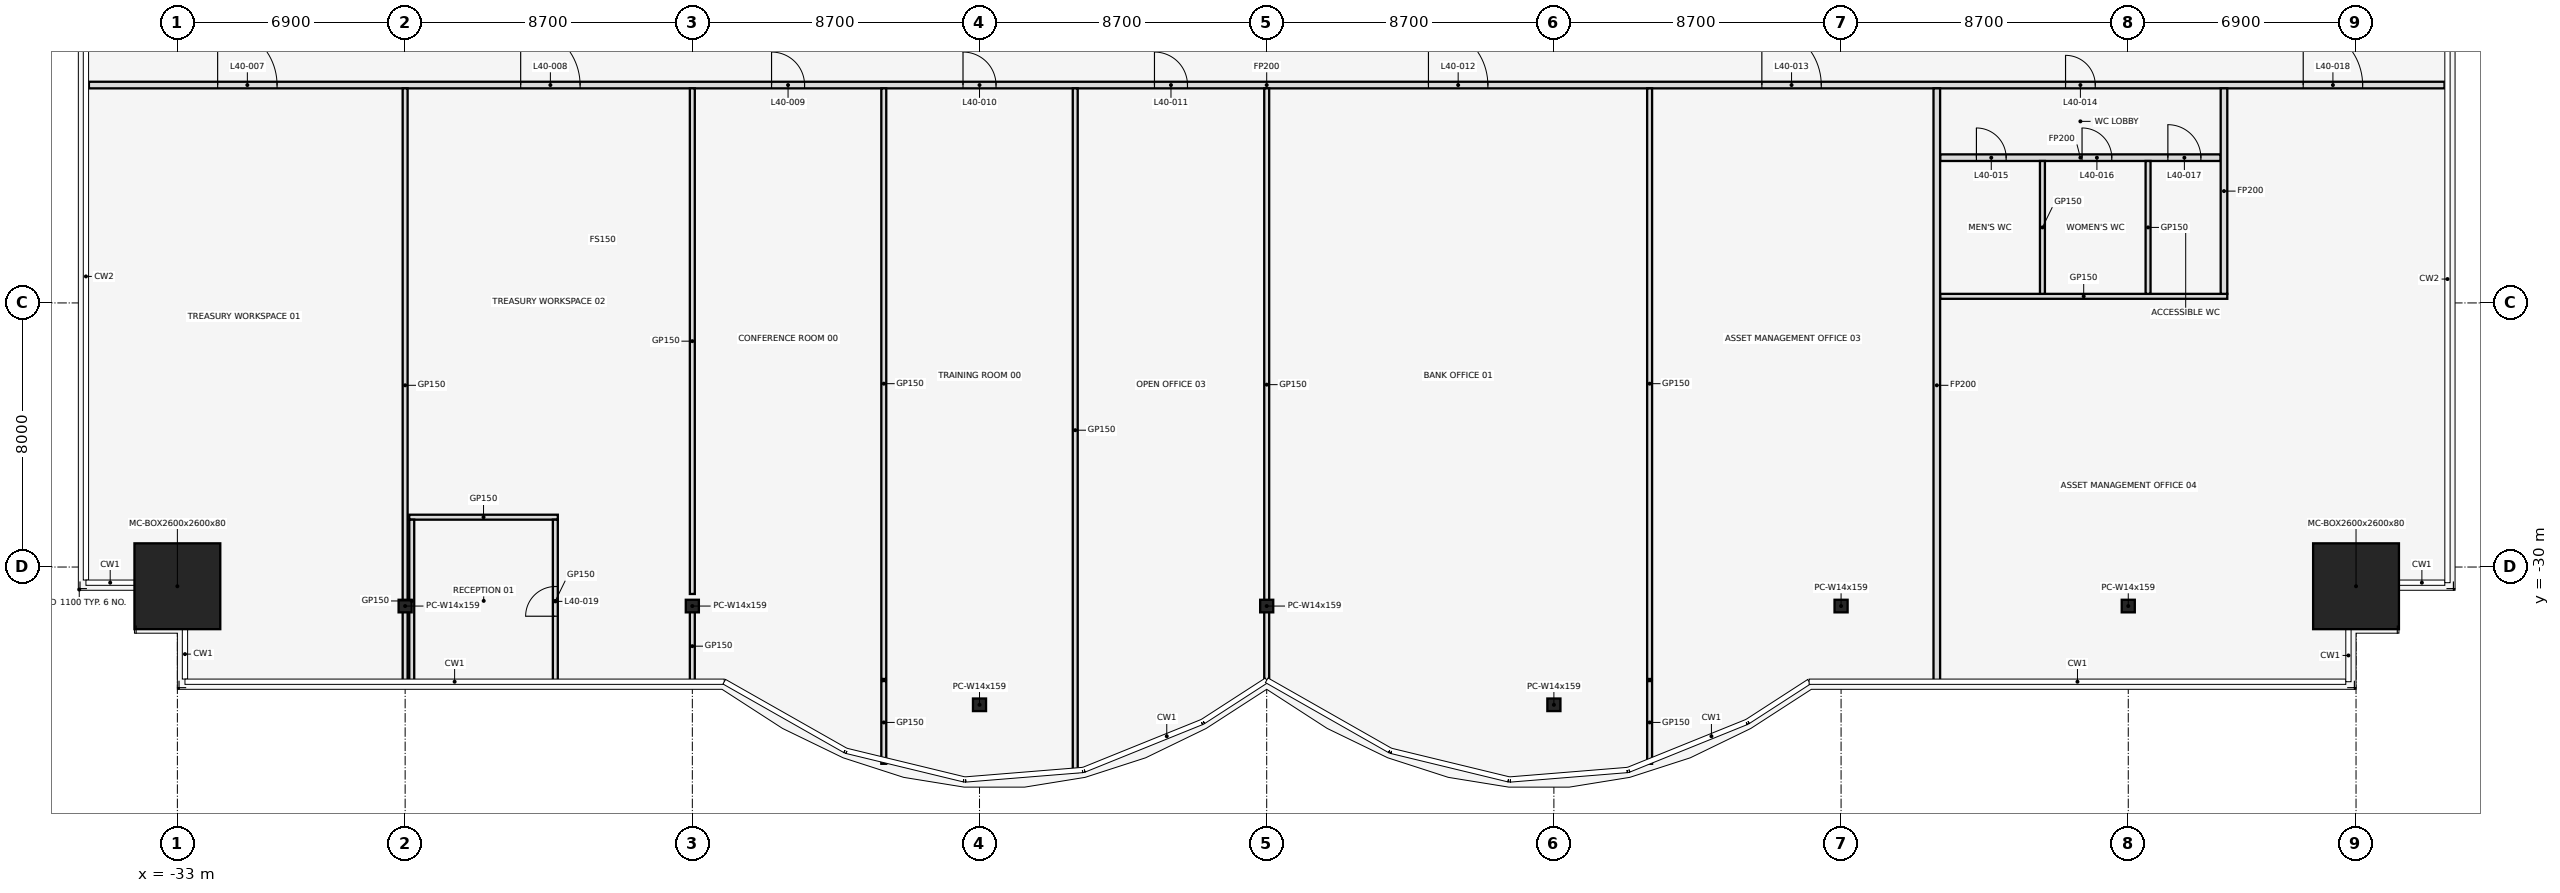
"""IFC4 building model, lengths in metres.
Left out: names, types, materials, properties, quantities, classifications, styles, units other than length and angle.
Written with IfcOpenShell. Run it as: python <this file> out.ifc"""

import sys

from ifc_helpers import new_model, si_unit, direction, frame, frame_2d, origin, origin_2d, place, context, subcontext, project, spatial, rectangle, hollow_rectangle, i_section, extrude, element, fill, save


model = new_model("IFC4")
c1 = context("Model", 3, precision=1e-05, world=origin(), true_north=direction((0.0, 1.0)))
c2 = subcontext(c1, "Body", "Model", "MODEL_VIEW")
j1 = project(units=[si_unit("LENGTHUNIT", "METRE"), si_unit("PLANEANGLEUNIT", "RADIAN")], contexts=[c1])
p1 = place(None, origin())
s1 = spatial("IfcSite", under=j1, at=p1, CompositionType="ELEMENT")
p2 = place(p1, origin())
s2 = spatial("IfcBuilding", under=s1, at=p2, CompositionType="ELEMENT")
p3 = place(p2, frame((0.0, 0.0, 181.4)))
s3 = spatial("IfcBuildingStorey", under=s2, at=p3, CompositionType="ELEMENT", Elevation=181.4)
p4 = place(p3, frame((-33.0, -30.582, 0.0), z_axis=(0.0, 0.0, 1.0), x_axis=(1.0, 0.0, 0.0)))
e1 = element("IfcColumn", 1, at=p4, inside=s3, PredefinedType="COLUMN", context=c2, shape_type="SweptSolid", body=[
    extrude(hollow_rectangle(XDim=2.6, YDim=2.6, WallThickness=0.08, at=origin_2d()), origin(), (0.0, 0.0, 1.0), 4.1),
])
for number, where, z_axis, x_axis in (
    (2, (-26.1, -31.182, 0.0), (0.0, 0.0, 1.0), (1.0, 0.0, 0.0)),
    (3, (-17.4, -31.182, 0.0), (0.0, 0.0, 1.0), (1.0, 0.0, 0.0)),
    (4, (-8.7, -34.173, 0.0), (0.0, 0.0, 1.0), (1.0, 0.0, 0.0)),
    (5, (0.0, -31.182, 0.0), (0.0, 0.0, 1.0), (1.0, 0.0, 0.0)),
    (6, (8.7, -34.173, 0.0), (0.0, 0.0, 1.0), (1.0, 0.0, 0.0)),
    (7, (17.4, -31.182, 0.0), (0.0, 0.0, 1.0), (1.0, 0.0, 0.0)),
    (8, (26.1, -31.182, 0.0), (0.0, 0.0, 1.0), (1.0, 0.0, 0.0)),
):
    element("IfcColumn", number, at=place(p3, frame(where, z_axis=z_axis, x_axis=x_axis)), inside=s3, PredefinedType="COLUMN", context=c2, shape_type="SweptSolid", body=[
        extrude(i_section(OverallWidth=0.396, OverallDepth=0.381, WebThickness=0.019, FlangeThickness=0.03, at=origin_2d()), origin(), (0.0, 0.0, 1.0), 4.1),
    ])
p5 = place(p3, frame((33.0, -30.582, 0.0), z_axis=(0.0, 0.0, 1.0), x_axis=(1.0, 0.0, 0.0)))
e9 = element("IfcColumn", 9, at=p5, inside=s3, PredefinedType="COLUMN", context=c2, shape_type="SweptSolid", body=[
    extrude(hollow_rectangle(XDim=2.6, YDim=2.6, WallThickness=0.08, at=origin_2d()), origin(), (0.0, 0.0, 1.0), 4.1),
])
p6 = place(p3, frame((-25.975, -28.49, 0.0), z_axis=(0.0, 0.0, 1.0), x_axis=(1.0, 0.0, 0.0)))
e10 = element("IfcWall", 10, at=p6, inside=s3, PredefinedType="PARTITIONING", context=c2, shape_type="SweptSolid", body=[
    extrude(rectangle(XDim=4.5, YDim=0.15, at=frame_2d((2.25, 0.0))), origin(), (0.0, 0.0, 1.0), 2.79),
])
p7 = place(p3, frame((20.4, -21.8, 0.0), z_axis=(0.0, 0.0, 1.0), x_axis=(1.0, 0.0, 0.0)))
e11 = element("IfcWall", 11, at=p7, inside=s3, PredefinedType="PARTITIONING", context=c2, shape_type="SweptSolid", body=[
    extrude(rectangle(XDim=8.7, YDim=0.15, at=frame_2d((4.35, 0.0))), origin(), (0.0, 0.0, 1.0), 2.79),
])
p8 = place(p3, frame((20.4, -17.6, 0.0), z_axis=(0.0, 0.0, 1.0), x_axis=(1.0, 0.0, 0.0)))
e12 = element("IfcWall", 12, at=p8, inside=s3, PredefinedType="PARTITIONING", context=c2, shape_type="SweptSolid", body=[
    extrude(rectangle(XDim=8.5, YDim=0.2, at=frame_2d((4.25, 0.0))), origin(), (0.0, 0.0, 1.0), 2.79),
])
p9 = place(p8, frame((1.1, 0.0, 0.0)))
e13 = element("IfcOpeningElement", 13, at=p9, cuts=e12, PredefinedType="OPENING", context=c2, shape_type="SweptSolid", body=[
    extrude(rectangle(XDim=0.9, YDim=2.1, at=frame_2d((0.45, 1.05))), frame((0.0, 0.112, 0.0), z_axis=(0.0, -1.0, 0.0), x_axis=(1.0, 0.0, 0.0)), (0.0, 0.0, 1.0), 0.224),
])
p10 = place(p8, frame((4.3, 0.0, 0.0)))
e14 = element("IfcOpeningElement", 14, at=p10, cuts=e12, PredefinedType="OPENING", context=c2, shape_type="SweptSolid", body=[
    extrude(rectangle(XDim=0.9, YDim=2.1, at=frame_2d((0.45, 1.05))), frame((0.0, 0.112, 0.0), z_axis=(0.0, -1.0, 0.0), x_axis=(1.0, 0.0, 0.0)), (0.0, 0.0, 1.0), 0.224),
])
p11 = place(p8, frame((6.9, 0.0, 0.0)))
e15 = element("IfcOpeningElement", 15, at=p11, cuts=e12, PredefinedType="OPENING", context=c2, shape_type="SweptSolid", body=[
    extrude(rectangle(XDim=1.0, YDim=2.1, at=frame_2d((0.5, 1.05))), frame((0.0, 0.112, 0.0), z_axis=(0.0, -1.0, 0.0), x_axis=(1.0, 0.0, 0.0)), (0.0, 0.0, 1.0), 0.224),
])
p12 = place(p3, frame((-35.68, -15.4, 0.0), z_axis=(0.0, 0.0, 1.0), x_axis=(1.0, 0.0, 0.0)))
e16 = element("IfcWall", 16, at=p12, inside=s3, PredefinedType="PARTITIONING", context=c2, shape_type="SweptSolid", body=[
    extrude(rectangle(XDim=71.36, YDim=0.2, at=frame_2d((35.68, 0.0))), origin(), (0.0, 0.0, 1.0), 2.79),
])
p13 = place(p12, frame((3.9, 0.0, 0.0)))
e17 = element("IfcOpeningElement", 17, at=p13, cuts=e16, PredefinedType="OPENING", context=c2, shape_type="SweptSolid", body=[
    extrude(rectangle(XDim=1.8, YDim=2.1, at=frame_2d((0.9, 1.05))), frame((0.0, 0.112, 0.0), z_axis=(0.0, -1.0, 0.0), x_axis=(1.0, 0.0, 0.0)), (0.0, 0.0, 1.0), 0.224),
])
p14 = place(p12, frame((13.08, 0.0, 0.0)))
e18 = element("IfcOpeningElement", 18, at=p14, cuts=e16, PredefinedType="OPENING", context=c2, shape_type="SweptSolid", body=[
    extrude(rectangle(XDim=1.8, YDim=2.1, at=frame_2d((0.9, 1.05))), frame((0.0, 0.112, 0.0), z_axis=(0.0, -1.0, 0.0), x_axis=(1.0, 0.0, 0.0)), (0.0, 0.0, 1.0), 0.224),
])
p15 = place(p12, frame((20.68, 0.0, 0.0)))
e19 = element("IfcOpeningElement", 19, at=p15, cuts=e16, PredefinedType="OPENING", context=c2, shape_type="SweptSolid", body=[
    extrude(rectangle(XDim=1.0, YDim=2.1, at=frame_2d((0.5, 1.05))), frame((0.0, 0.112, 0.0), z_axis=(0.0, -1.0, 0.0), x_axis=(1.0, 0.0, 0.0)), (0.0, 0.0, 1.0), 0.224),
])
p16 = place(p12, frame((26.48, 0.0, 0.0)))
e20 = element("IfcOpeningElement", 20, at=p16, cuts=e16, PredefinedType="OPENING", context=c2, shape_type="SweptSolid", body=[
    extrude(rectangle(XDim=1.0, YDim=2.1, at=frame_2d((0.5, 1.05))), frame((0.0, 0.112, 0.0), z_axis=(0.0, -1.0, 0.0), x_axis=(1.0, 0.0, 0.0)), (0.0, 0.0, 1.0), 0.224),
])
p17 = place(p12, frame((32.28, 0.0, 0.0)))
e21 = element("IfcOpeningElement", 21, at=p17, cuts=e16, PredefinedType="OPENING", context=c2, shape_type="SweptSolid", body=[
    extrude(rectangle(XDim=1.0, YDim=2.1, at=frame_2d((0.5, 1.05))), frame((0.0, 0.112, 0.0), z_axis=(0.0, -1.0, 0.0), x_axis=(1.0, 0.0, 0.0)), (0.0, 0.0, 1.0), 0.224),
])
p18 = place(p12, frame((40.58, 0.0, 0.0)))
e22 = element("IfcOpeningElement", 22, at=p18, cuts=e16, PredefinedType="OPENING", context=c2, shape_type="SweptSolid", body=[
    extrude(rectangle(XDim=1.8, YDim=2.1, at=frame_2d((0.9, 1.05))), frame((0.0, 0.112, 0.0), z_axis=(0.0, -1.0, 0.0), x_axis=(1.0, 0.0, 0.0)), (0.0, 0.0, 1.0), 0.224),
])
p19 = place(p12, frame((50.68, 0.0, 0.0)))
e23 = element("IfcOpeningElement", 23, at=p19, cuts=e16, PredefinedType="OPENING", context=c2, shape_type="SweptSolid", body=[
    extrude(rectangle(XDim=1.8, YDim=2.1, at=frame_2d((0.9, 1.05))), frame((0.0, 0.112, 0.0), z_axis=(0.0, -1.0, 0.0), x_axis=(1.0, 0.0, 0.0)), (0.0, 0.0, 1.0), 0.224),
])
p20 = place(p12, frame((59.88, 0.0, 0.0)))
e24 = element("IfcOpeningElement", 24, at=p20, cuts=e16, PredefinedType="OPENING", context=c2, shape_type="SweptSolid", body=[
    extrude(rectangle(XDim=0.9, YDim=2.1, at=frame_2d((0.45, 1.05))), frame((0.0, 0.112, 0.0), z_axis=(0.0, -1.0, 0.0), x_axis=(1.0, 0.0, 0.0)), (0.0, 0.0, 1.0), 0.224),
])
p21 = place(p12, frame((67.08, 0.0, 0.0)))
e25 = element("IfcOpeningElement", 25, at=p21, cuts=e16, PredefinedType="OPENING", context=c2, shape_type="SweptSolid", body=[
    extrude(rectangle(XDim=1.8, YDim=2.1, at=frame_2d((0.9, 1.05))), frame((0.0, 0.112, 0.0), z_axis=(0.0, -1.0, 0.0), x_axis=(1.0, 0.0, 0.0)), (0.0, 0.0, 1.0), 0.224),
])
p22 = place(p3, frame((-26.1, -33.49, 0.0), z_axis=(0.0, 0.0, 1.0), x_axis=(0.0, 1.0, 0.0)))
e26 = element("IfcWall", 26, at=p22, inside=s3, PredefinedType="PARTITIONING", context=c2, shape_type="SweptSolid", body=[
    extrude(rectangle(XDim=17.99, YDim=0.15, at=frame_2d((8.995, 0.0))), origin(), (0.0, 0.0, 1.0), 2.79),
])
p23 = place(p3, frame((-25.9, -33.49, 0.0), z_axis=(0.0, 0.0, 1.0), x_axis=(0.0, 1.0, 0.0)))
e27 = element("IfcWall", 27, at=p23, inside=s3, PredefinedType="PARTITIONING", context=c2, shape_type="SweptSolid", body=[
    extrude(rectangle(XDim=4.925, YDim=0.15, at=frame_2d((2.462, 0.0))), origin(), (0.0, 0.0, 1.0), 2.79),
])
p24 = place(p3, frame((-21.55, -33.49, 0.0), z_axis=(0.0, 0.0, 1.0), x_axis=(0.0, 1.0, 0.0)))
e28 = element("IfcWall", 28, at=p24, inside=s3, PredefinedType="PARTITIONING", context=c2, shape_type="SweptSolid", body=[
    extrude(rectangle(XDim=4.925, YDim=0.15, at=frame_2d((2.462, 0.0))), origin(), (0.0, 0.0, 1.0), 2.79),
])
p25 = place(p24, frame((2.0, 0.0, 0.0)))
e29 = element("IfcOpeningElement", 29, at=p25, cuts=e28, PredefinedType="OPENING", context=c2, shape_type="SweptSolid", body=[
    extrude(rectangle(XDim=0.9, YDim=2.1, at=frame_2d((0.45, 1.05))), frame((0.0, 0.087, 0.0), z_axis=(0.0, -1.0, 0.0), x_axis=(1.0, 0.0, 0.0)), (0.0, 0.0, 1.0), 0.174),
])
p26 = place(p3, frame((-17.4, -33.49, 0.0), z_axis=(0.0, 0.0, 1.0), x_axis=(0.0, 1.0, 0.0)))
e30 = element("IfcWall", 30, at=p26, inside=s3, PredefinedType="PARTITIONING", context=c2, shape_type="SweptSolid", body=[
    extrude(rectangle(XDim=2.186, YDim=0.15, at=frame_2d((1.093, 0.0))), origin(), (0.0, 0.0, 1.0), 2.79),
])
p27 = place(p3, frame((-17.4, -30.816, 0.0), z_axis=(0.0, 0.0, 1.0), x_axis=(0.0, 1.0, 0.0)))
e31 = element("IfcWall", 31, at=p27, inside=s3, PredefinedType="PARTITIONING", context=c2, shape_type="SweptSolid", body=[
    extrude(rectangle(XDim=15.316, YDim=0.15, at=frame_2d((7.658, 0.0))), origin(), (0.0, 0.0, 1.0), 2.79),
])
p28 = place(p3, frame((-11.6, -35.96, 0.0), z_axis=(0.0, 0.0, 1.0), x_axis=(0.0, 1.0, 0.0)))
e32 = element("IfcWall", 32, at=p28, inside=s3, PredefinedType="PARTITIONING", context=c2, shape_type="SweptSolid", body=[
    extrude(rectangle(XDim=2.506, YDim=0.15, at=frame_2d((1.253, 0.0))), origin(), (0.0, 0.0, 1.0), 2.79),
])
p29 = place(p3, frame((-11.6, -33.391, 0.0), z_axis=(0.0, 0.0, 1.0), x_axis=(0.0, 1.0, 0.0)))
e33 = element("IfcWall", 33, at=p29, inside=s3, PredefinedType="PARTITIONING", context=c2, shape_type="SweptSolid", body=[
    extrude(rectangle(XDim=17.891, YDim=0.15, at=frame_2d((8.946, 0.0))), origin(), (0.0, 0.0, 1.0), 2.79),
])
p30 = place(p3, frame((-5.8, -36.21, 0.0), z_axis=(0.0, 0.0, 1.0), x_axis=(0.0, 1.0, 0.0)))
e34 = element("IfcWall", 34, at=p30, inside=s3, PredefinedType="PARTITIONING", context=c2, shape_type="SweptSolid", body=[
    extrude(rectangle(XDim=20.71, YDim=0.15, at=frame_2d((10.355, 0.0))), origin(), (0.0, 0.0, 1.0), 2.79),
])
p31 = place(p3, frame((0.0, -33.45, 0.0), z_axis=(0.0, 0.0, 1.0), x_axis=(0.0, 1.0, 0.0)))
e35 = element("IfcWall", 35, at=p31, inside=s3, PredefinedType="PARTITIONING", context=c2, shape_type="SweptSolid", body=[
    extrude(rectangle(XDim=17.95, YDim=0.15, at=frame_2d((8.975, 0.0))), origin(), (0.0, 0.0, 1.0), 2.79),
])
p32 = place(p3, frame((11.6, -35.96, 0.0), z_axis=(0.0, 0.0, 1.0), x_axis=(0.0, 1.0, 0.0)))
e36 = element("IfcWall", 36, at=p32, inside=s3, PredefinedType="PARTITIONING", context=c2, shape_type="SweptSolid", body=[
    extrude(rectangle(XDim=2.506, YDim=0.15, at=frame_2d((1.253, 0.0))), origin(), (0.0, 0.0, 1.0), 2.79),
])
p33 = place(p3, frame((11.6, -33.391, 0.0), z_axis=(0.0, 0.0, 1.0), x_axis=(0.0, 1.0, 0.0)))
e37 = element("IfcWall", 37, at=p33, inside=s3, PredefinedType="PARTITIONING", context=c2, shape_type="SweptSolid", body=[
    extrude(rectangle(XDim=17.891, YDim=0.15, at=frame_2d((8.946, 0.0))), origin(), (0.0, 0.0, 1.0), 2.79),
])
p34 = place(p3, frame((20.3, -33.49, 0.0), z_axis=(0.0, 0.0, 1.0), x_axis=(0.0, 1.0, 0.0)))
e38 = element("IfcWall", 38, at=p34, inside=s3, PredefinedType="PARTITIONING", context=c2, shape_type="SweptSolid", body=[
    extrude(rectangle(XDim=17.99, YDim=0.2, at=frame_2d((8.995, 0.0))), origin(), (0.0, 0.0, 1.0), 2.79),
])
for number, where, z_axis, x_axis in (
    (39, (23.5, -21.725, 0.0), (0.0, 0.0, 1.0), (0.0, 1.0, 0.0)),
    (40, (26.7, -21.725, 0.0), (0.0, 0.0, 1.0), (0.0, 1.0, 0.0)),
):
    element("IfcWall", number, at=place(p3, frame(where, z_axis=z_axis, x_axis=x_axis)), inside=s3, PredefinedType="PARTITIONING", context=c2, shape_type="SweptSolid", body=[
        extrude(rectangle(XDim=4.025, YDim=0.15, at=frame_2d((2.013, 0.0))), origin(), (0.0, 0.0, 1.0), 2.79),
    ])
p35 = place(p3, frame((29.0, -21.725, 0.0), z_axis=(0.0, 0.0, 1.0), x_axis=(0.0, 1.0, 0.0)))
e41 = element("IfcWall", 41, at=p35, inside=s3, PredefinedType="PARTITIONING", context=c2, shape_type="SweptSolid", body=[
    extrude(rectangle(XDim=6.225, YDim=0.2, at=frame_2d((3.113, 0.0))), origin(), (0.0, 0.0, 1.0), 2.79),
])
p36 = place(p13, origin())
e42 = element("IfcDoor", 42, at=p36, inside=s3, OperationType="SINGLE_SWING_LEFT", PredefinedType="DOOR", context=c2, shape_type="SweptSolid", body=[
    extrude(rectangle(XDim=1.8, YDim=2.1, at=frame_2d((0.9, 1.05))), frame((0.0, 0.025, 0.0), z_axis=(0.0, -1.0, 0.0), x_axis=(1.0, 0.0, 0.0)), (0.0, 0.0, 1.0), 0.05),
])
fill(e17, e42)
p37 = place(p14, origin())
e43 = element("IfcDoor", 43, at=p37, inside=s3, OperationType="SINGLE_SWING_LEFT", PredefinedType="DOOR", context=c2, shape_type="SweptSolid", body=[
    extrude(rectangle(XDim=1.8, YDim=2.1, at=frame_2d((0.9, 1.05))), frame((0.0, 0.025, 0.0), z_axis=(0.0, -1.0, 0.0), x_axis=(1.0, 0.0, 0.0)), (0.0, 0.0, 1.0), 0.05),
])
fill(e18, e43)
p38 = place(p15, frame((1.0, 0.0, 0.0), z_axis=(0.0, 0.0, 1.0), x_axis=(-1.0, 0.0, 0.0)))
e44 = element("IfcDoor", 44, at=p38, inside=s3, OperationType="SINGLE_SWING_RIGHT", PredefinedType="DOOR", context=c2, shape_type="SweptSolid", body=[
    extrude(rectangle(XDim=1.0, YDim=2.1, at=frame_2d((0.5, 1.05))), frame((0.0, 0.025, 0.0), z_axis=(0.0, -1.0, 0.0), x_axis=(1.0, 0.0, 0.0)), (0.0, 0.0, 1.0), 0.05),
])
fill(e19, e44)
p39 = place(p16, frame((1.0, 0.0, 0.0), z_axis=(0.0, 0.0, 1.0), x_axis=(-1.0, 0.0, 0.0)))
e45 = element("IfcDoor", 45, at=p39, inside=s3, OperationType="SINGLE_SWING_LEFT", PredefinedType="DOOR", context=c2, shape_type="SweptSolid", body=[
    extrude(rectangle(XDim=1.0, YDim=2.1, at=frame_2d((0.5, 1.05))), frame((0.0, 0.025, 0.0), z_axis=(0.0, -1.0, 0.0), x_axis=(1.0, 0.0, 0.0)), (0.0, 0.0, 1.0), 0.05),
])
fill(e20, e45)
p40 = place(p17, frame((1.0, 0.0, 0.0), z_axis=(0.0, 0.0, 1.0), x_axis=(-1.0, 0.0, 0.0)))
e46 = element("IfcDoor", 46, at=p40, inside=s3, OperationType="SINGLE_SWING_RIGHT", PredefinedType="DOOR", context=c2, shape_type="SweptSolid", body=[
    extrude(rectangle(XDim=1.0, YDim=2.1, at=frame_2d((0.5, 1.05))), frame((0.0, 0.025, 0.0), z_axis=(0.0, -1.0, 0.0), x_axis=(1.0, 0.0, 0.0)), (0.0, 0.0, 1.0), 0.05),
])
fill(e21, e46)
p41 = place(p18, origin())
e47 = element("IfcDoor", 47, at=p41, inside=s3, OperationType="SINGLE_SWING_LEFT", PredefinedType="DOOR", context=c2, shape_type="SweptSolid", body=[
    extrude(rectangle(XDim=1.8, YDim=2.1, at=frame_2d((0.9, 1.05))), frame((0.0, 0.025, 0.0), z_axis=(0.0, -1.0, 0.0), x_axis=(1.0, 0.0, 0.0)), (0.0, 0.0, 1.0), 0.05),
])
fill(e22, e47)
p42 = place(p19, origin())
e48 = element("IfcDoor", 48, at=p42, inside=s3, OperationType="SINGLE_SWING_LEFT", PredefinedType="DOOR", context=c2, shape_type="SweptSolid", body=[
    extrude(rectangle(XDim=1.8, YDim=2.1, at=frame_2d((0.9, 1.05))), frame((0.0, 0.025, 0.0), z_axis=(0.0, -1.0, 0.0), x_axis=(1.0, 0.0, 0.0)), (0.0, 0.0, 1.0), 0.05),
])
fill(e23, e48)
p43 = place(p20, frame((0.9, 0.0, 0.0), z_axis=(0.0, 0.0, 1.0), x_axis=(-1.0, 0.0, 0.0)))
e49 = element("IfcDoor", 49, at=p43, inside=s3, OperationType="SINGLE_SWING_RIGHT", PredefinedType="DOOR", context=c2, shape_type="SweptSolid", body=[
    extrude(rectangle(XDim=0.9, YDim=2.1, at=frame_2d((0.45, 1.05))), frame((0.0, 0.025, 0.0), z_axis=(0.0, -1.0, 0.0), x_axis=(1.0, 0.0, 0.0)), (0.0, 0.0, 1.0), 0.05),
])
fill(e24, e49)
p44 = place(p9, frame((0.9, 0.0, 0.0), z_axis=(0.0, 0.0, 1.0), x_axis=(-1.0, 0.0, 0.0)))
e50 = element("IfcDoor", 50, at=p44, inside=s3, OperationType="SINGLE_SWING_RIGHT", PredefinedType="DOOR", context=c2, shape_type="SweptSolid", body=[
    extrude(rectangle(XDim=0.9, YDim=2.1, at=frame_2d((0.45, 1.05))), frame((0.0, 0.025, 0.0), z_axis=(0.0, -1.0, 0.0), x_axis=(1.0, 0.0, 0.0)), (0.0, 0.0, 1.0), 0.05),
])
fill(e13, e50)
p45 = place(p10, frame((0.9, 0.0, 0.0), z_axis=(0.0, 0.0, 1.0), x_axis=(-1.0, 0.0, 0.0)))
e51 = element("IfcDoor", 51, at=p45, inside=s3, OperationType="SINGLE_SWING_LEFT", PredefinedType="DOOR", context=c2, shape_type="SweptSolid", body=[
    extrude(rectangle(XDim=0.9, YDim=2.1, at=frame_2d((0.45, 1.05))), frame((0.0, 0.025, 0.0), z_axis=(0.0, -1.0, 0.0), x_axis=(1.0, 0.0, 0.0)), (0.0, 0.0, 1.0), 0.05),
])
fill(e14, e51)
p46 = place(p11, frame((1.0, 0.0, 0.0), z_axis=(0.0, 0.0, 1.0), x_axis=(-1.0, 0.0, 0.0)))
e52 = element("IfcDoor", 52, at=p46, inside=s3, OperationType="SINGLE_SWING_RIGHT", PredefinedType="DOOR", context=c2, shape_type="SweptSolid", body=[
    extrude(rectangle(XDim=1.0, YDim=2.1, at=frame_2d((0.5, 1.05))), frame((0.0, 0.025, 0.0), z_axis=(0.0, -1.0, 0.0), x_axis=(1.0, 0.0, 0.0)), (0.0, 0.0, 1.0), 0.05),
])
fill(e15, e52)
p47 = place(p21, origin())
e53 = element("IfcDoor", 53, at=p47, inside=s3, OperationType="SINGLE_SWING_LEFT", PredefinedType="DOOR", context=c2, shape_type="SweptSolid", body=[
    extrude(rectangle(XDim=1.8, YDim=2.1, at=frame_2d((0.9, 1.05))), frame((0.0, 0.025, 0.0), z_axis=(0.0, -1.0, 0.0), x_axis=(1.0, 0.0, 0.0)), (0.0, 0.0, 1.0), 0.05),
])
fill(e25, e53)
p48 = place(p25, origin())
e54 = element("IfcDoor", 54, at=p48, inside=s3, OperationType="SINGLE_SWING_LEFT", PredefinedType="DOOR", context=c2, shape_type="SweptSolid", body=[
    extrude(rectangle(XDim=0.9, YDim=2.1, at=frame_2d((0.45, 1.05))), frame((0.0, 0.025, 0.0), z_axis=(0.0, -1.0, 0.0), x_axis=(1.0, 0.0, 0.0)), (0.0, 0.0, 1.0), 0.05),
])
fill(e29, e54)
save(model, sys.argv[1])
